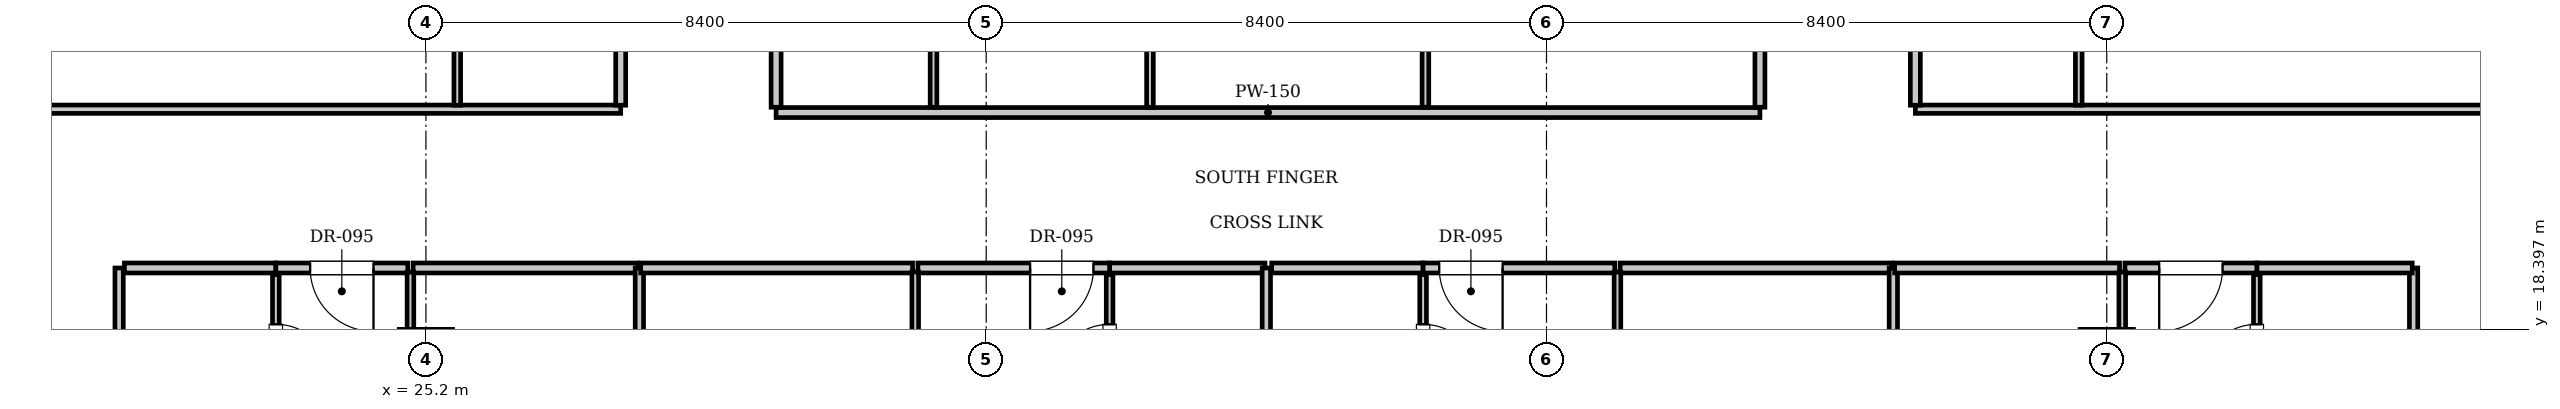
"""IFC4 building model, lengths in metres.
Left out: names, types, materials, properties, quantities, classifications, styles, units other than length and angle.
Written with IfcOpenShell. Run it as: python <this file> out.ifc"""

import sys

from ifc_helpers import new_model, si_unit, direction, frame, frame_2d, origin, origin_2d, place, context, subcontext, project, spatial, rectangle, extrude, element, fill, save


model = new_model("IFC4")
c1 = context("Model", 3, precision=1e-05, world=origin(), true_north=direction((0.0, 1.0)))
c2 = subcontext(c1, "Body", "Model", "MODEL_VIEW")
j1 = project(units=[si_unit("LENGTHUNIT", "METRE"), si_unit("PLANEANGLEUNIT", "RADIAN")], contexts=[c1])
p1 = place(None, origin())
s1 = spatial("IfcSite", under=j1, at=p1, CompositionType="ELEMENT")
p2 = place(p1, origin())
s2 = spatial("IfcBuilding", under=s1, at=p2, CompositionType="ELEMENT")
p3 = place(p2, frame((0.0, 0.0, 308.7)))
s3 = spatial("IfcBuildingStorey", under=s2, at=p3, CompositionType="ELEMENT", Elevation=308.7)
for number, where, z_axis, x_axis in (
    (1, (25.2, 18.0, 0.0), (0.0, 0.0, 1.0), (1.0, 0.0, 0.0)),
    (2, (50.4, 18.0, 0.0), (0.0, 0.0, 1.0), (1.0, 0.0, 0.0)),
):
    element("IfcColumn", number, at=place(p3, frame(where, z_axis=z_axis, x_axis=x_axis)), inside=s3, PredefinedType="COLUMN", context=c2, shape_type="SweptSolid", body=[
        extrude(rectangle(XDim=0.8, YDim=0.8, at=origin_2d()), origin(), (0.0, 0.0, 1.0), 3.85),
    ])
p4 = place(p3, frame((30.45, 21.65, 0.0), z_axis=(0.0, 0.0, 1.0), x_axis=(1.0, 0.0, 0.0)))
e3 = element("IfcWall", 3, at=p4, inside=s3, PredefinedType="PARTITIONING", context=c2, shape_type="SweptSolid", body=[
    extrude(rectangle(XDim=14.75, YDim=0.15, at=frame_2d((7.375, 0.0))), origin(), (0.0, 0.0, 1.0), 3.61),
])
for number, where, z_axis, x_axis in (
    (4, (30.45, 21.73, 0.0), (0.0, 0.0, 1.0), (0.0, 1.0, 0.0)),
    (5, (45.2, 21.73, 0.0), (0.0, 0.0, 1.0), (0.0, 1.0, 0.0)),
):
    element("IfcWall", number, at=place(p3, frame(where, z_axis=z_axis, x_axis=x_axis)), inside=s3, PredefinedType="PARTITIONING", context=c2, shape_type="SweptSolid", body=[
        extrude(rectangle(XDim=8.49, YDim=0.15, at=frame_2d((4.245, 0.0))), origin(), (0.0, 0.0, 1.0), 3.61),
    ])
for number, where, z_axis, x_axis in (
    (6, (32.81, 21.73, 0.0), (0.0, 0.0, 1.0), (0.0, 1.0, 0.0)),
    (7, (36.055, 21.73, 0.0), (0.0, 0.0, 1.0), (0.0, 1.0, 0.0)),
    (8, (40.185, 21.73, 0.0), (0.0, 0.0, 1.0), (0.0, 1.0, 0.0)),
):
    element("IfcWall", number, at=place(p3, frame(where, z_axis=z_axis, x_axis=x_axis)), inside=s3, PredefinedType="PARTITIONING", context=c2, shape_type="SweptSolid", body=[
        extrude(rectangle(XDim=8.49, YDim=0.1, at=frame_2d((4.245, 0.0))), origin(), (0.0, 0.0, 1.0), 3.61),
    ])
for number, where, z_axis, x_axis in (
    (9, (20.6, 14.4, 0.0), (0.0, 0.0, 1.0), (0.0, 1.0, 0.0)),
    (10, (55.0, 14.4, 0.0), (0.0, 0.0, 1.0), (0.0, 1.0, 0.0)),
):
    element("IfcWall", number, at=place(p3, frame(where, z_axis=z_axis, x_axis=x_axis)), inside=s3, PredefinedType="PARTITIONING", context=c2, shape_type="SweptSolid", body=[
        extrude(rectangle(XDim=4.92, YDim=0.125, at=frame_2d((2.46, 0.0))), origin(), (0.0, 0.0, 1.0), 3.61),
    ])
p5 = place(p3, frame((20.68, 19.32, 0.0), z_axis=(0.0, 0.0, 1.0), x_axis=(1.0, 0.0, 0.0)))
e11 = element("IfcWall", 11, at=p5, inside=s3, PredefinedType="PARTITIONING", context=c2, shape_type="SweptSolid", body=[
    extrude(rectangle(XDim=2.27, YDim=0.15, at=frame_2d((1.135, 0.0))), origin(), (0.0, 0.0, 1.0), 3.61),
])
p6 = place(p3, frame((22.95, 16.88, 0.0), z_axis=(0.0, 0.0, 1.0), x_axis=(0.0, 1.0, 0.0)))
e12 = element("IfcWall", 12, at=p6, inside=s3, PredefinedType="PARTITIONING", context=c2, shape_type="SweptSolid", body=[
    extrude(rectangle(XDim=2.34, YDim=0.1, at=frame_2d((1.17, 0.0))), origin(), (0.0, 0.0, 1.0), 3.61),
])
p7 = place(p6, frame((0.745, 0.0, 0.0)))
e13 = element("IfcOpeningElement", 13, at=p7, cuts=e12, PredefinedType="OPENING", context=c2, shape_type="SweptSolid", body=[
    extrude(rectangle(XDim=0.85, YDim=2.1, at=frame_2d((0.425, 1.05))), frame((0.0, 0.06, 0.0), z_axis=(0.0, -1.0, 0.0), x_axis=(1.0, 0.0, 0.0)), (0.0, 0.0, 1.0), 0.12),
])
p8 = place(p3, frame((22.95, 19.32, 0.0), z_axis=(0.0, 0.0, 1.0), x_axis=(1.0, 0.0, 0.0)))
e14 = element("IfcWall", 14, at=p8, inside=s3, PredefinedType="PARTITIONING", context=c2, shape_type="SweptSolid", body=[
    extrude(rectangle(XDim=1.978, YDim=0.15, at=frame_2d((0.989, 0.0))), origin(), (0.0, 0.0, 1.0), 3.61),
])
p9 = place(p8, frame((0.514, 0.0, 0.0)))
e15 = element("IfcOpeningElement", 15, at=p9, cuts=e14, PredefinedType="OPENING", context=c2, shape_type="SweptSolid", body=[
    extrude(rectangle(XDim=0.95, YDim=2.15, at=frame_2d((0.475, 1.075))), frame((0.0, 0.085, 0.0), z_axis=(0.0, -1.0, 0.0), x_axis=(1.0, 0.0, 0.0)), (0.0, 0.0, 1.0), 0.17),
])
p10 = place(p3, frame((25.008, 19.32, 0.0), z_axis=(0.0, 0.0, 1.0), x_axis=(1.0, 0.0, 0.0)))
e16 = element("IfcWall", 16, at=p10, inside=s3, PredefinedType="PARTITIONING", context=c2, shape_type="SweptSolid", body=[
    extrude(rectangle(XDim=3.372, YDim=0.15, at=frame_2d((1.686, 0.0))), origin(), (0.0, 0.0, 1.0), 3.61),
])
p11 = place(p3, frame((24.968, 9.23, 0.0), z_axis=(0.0, 0.0, 1.0), x_axis=(0.0, 1.0, 0.0)))
e17 = element("IfcWall", 17, at=p11, inside=s3, PredefinedType="PARTITIONING", context=c2, shape_type="SweptSolid", body=[
    extrude(rectangle(XDim=10.03, YDim=0.1, at=frame_2d((5.015, 0.0))), origin(), (0.0, 0.0, 1.0), 3.61),
])
p12 = place(p11, frame((1.6, 0.0, 0.0)))
e18 = element("IfcOpeningElement", 18, at=p12, cuts=e17, PredefinedType="OPENING", context=c2, shape_type="SweptSolid", body=[
    extrude(rectangle(XDim=0.9, YDim=2.1, at=frame_2d((0.45, 1.05))), frame((0.0, 0.06, 0.0), z_axis=(0.0, -1.0, 0.0), x_axis=(1.0, 0.0, 0.0)), (0.0, 0.0, 1.0), 0.12),
])
p13 = place(p3, frame((28.4, 9.3, 0.0), z_axis=(0.0, 0.0, 1.0), x_axis=(0.0, 1.0, 0.0)))
e19 = element("IfcWall", 19, at=p13, inside=s3, PredefinedType="PARTITIONING", context=c2, shape_type="SweptSolid", body=[
    extrude(rectangle(XDim=10.02, YDim=0.125, at=frame_2d((5.01, 0.0))), origin(), (0.0, 0.0, 1.0), 3.61),
])
p14 = place(p3, frame((35.45, 19.32, 0.0), z_axis=(0.0, 0.0, 1.0), x_axis=(1.0, 0.0, 0.0)))
e20 = element("IfcWall", 20, at=p14, inside=s3, PredefinedType="PARTITIONING", context=c2, shape_type="SweptSolid", body=[
    extrude(rectangle(XDim=2.33, YDim=0.15, at=frame_2d((1.165, 0.0))), origin(), (0.0, 0.0, 1.0), 3.61),
])
p15 = place(p3, frame((35.45, 16.88, 0.0), z_axis=(0.0, 0.0, 1.0), x_axis=(0.0, 1.0, 0.0)))
e21 = element("IfcWall", 21, at=p15, inside=s3, PredefinedType="PARTITIONING", context=c2, shape_type="SweptSolid", body=[
    extrude(rectangle(XDim=2.34, YDim=0.1, at=frame_2d((1.17, 0.0))), origin(), (0.0, 0.0, 1.0), 3.61),
])
p16 = place(p15, frame((0.745, 0.0, 0.0)))
e22 = element("IfcOpeningElement", 22, at=p16, cuts=e21, PredefinedType="OPENING", context=c2, shape_type="SweptSolid", body=[
    extrude(rectangle(XDim=0.85, YDim=2.1, at=frame_2d((0.425, 1.05))), frame((0.0, 0.06, 0.0), z_axis=(0.0, -1.0, 0.0), x_axis=(1.0, 0.0, 0.0)), (0.0, 0.0, 1.0), 0.12),
])
p17 = place(p3, frame((28.42, 19.32, 0.0), z_axis=(0.0, 0.0, 1.0), x_axis=(1.0, 0.0, 0.0)))
e23 = element("IfcWall", 23, at=p17, inside=s3, PredefinedType="PARTITIONING", context=c2, shape_type="SweptSolid", body=[
    extrude(rectangle(XDim=4.076, YDim=0.15, at=frame_2d((2.038, 0.0))), origin(), (0.0, 0.0, 1.0), 3.61),
])
p18 = place(p3, frame((32.576, 19.32, 0.0), z_axis=(0.0, 0.0, 1.0), x_axis=(1.0, 0.0, 0.0)))
e24 = element("IfcWall", 24, at=p18, inside=s3, PredefinedType="PARTITIONING", context=c2, shape_type="SweptSolid", body=[
    extrude(rectangle(XDim=2.874, YDim=0.15, at=frame_2d((1.437, 0.0))), origin(), (0.0, 0.0, 1.0), 3.61),
])
p19 = place(p18, frame((1.682, 0.0, 0.0)))
e25 = element("IfcOpeningElement", 25, at=p19, cuts=e24, PredefinedType="OPENING", context=c2, shape_type="SweptSolid", body=[
    extrude(rectangle(XDim=0.95, YDim=2.15, at=frame_2d((0.475, 1.075))), frame((0.0, 0.085, 0.0), z_axis=(0.0, -1.0, 0.0), x_axis=(1.0, 0.0, 0.0)), (0.0, 0.0, 1.0), 0.17),
])
p20 = place(p3, frame((32.536, 9.23, 0.0), z_axis=(0.0, 0.0, 1.0), x_axis=(0.0, 1.0, 0.0)))
e26 = element("IfcWall", 26, at=p20, inside=s3, PredefinedType="PARTITIONING", context=c2, shape_type="SweptSolid", body=[
    extrude(rectangle(XDim=10.03, YDim=0.1, at=frame_2d((5.015, 0.0))), origin(), (0.0, 0.0, 1.0), 3.61),
])
p21 = place(p20, frame((1.6, 0.0, 0.0)))
e27 = element("IfcOpeningElement", 27, at=p21, cuts=e26, PredefinedType="OPENING", context=c2, shape_type="SweptSolid", body=[
    extrude(rectangle(XDim=0.9, YDim=2.1, at=frame_2d((0.45, 1.05))), frame((0.0, 0.06, 0.0), z_axis=(0.0, -1.0, 0.0), x_axis=(1.0, 0.0, 0.0)), (0.0, 0.0, 1.0), 0.12),
])
p22 = place(p3, frame((37.8, 9.3, 0.0), z_axis=(0.0, 0.0, 1.0), x_axis=(0.0, 1.0, 0.0)))
e28 = element("IfcWall", 28, at=p22, inside=s3, PredefinedType="PARTITIONING", context=c2, shape_type="SweptSolid", body=[
    extrude(rectangle(XDim=10.02, YDim=0.125, at=frame_2d((5.01, 0.0))), origin(), (0.0, 0.0, 1.0), 3.255),
])
p23 = place(p3, frame((37.88, 19.32, 0.0), z_axis=(0.0, 0.0, 1.0), x_axis=(1.0, 0.0, 0.0)))
e29 = element("IfcWall", 29, at=p23, inside=s3, PredefinedType="PARTITIONING", context=c2, shape_type="SweptSolid", body=[
    extrude(rectangle(XDim=2.27, YDim=0.15, at=frame_2d((1.135, 0.0))), origin(), (0.0, 0.0, 1.0), 3.61),
])
p24 = place(p3, frame((40.15, 16.88, 0.0), z_axis=(0.0, 0.0, 1.0), x_axis=(0.0, 1.0, 0.0)))
e30 = element("IfcWall", 30, at=p24, inside=s3, PredefinedType="PARTITIONING", context=c2, shape_type="SweptSolid", body=[
    extrude(rectangle(XDim=2.34, YDim=0.1, at=frame_2d((1.17, 0.0))), origin(), (0.0, 0.0, 1.0), 3.61),
])
p25 = place(p24, frame((0.745, 0.0, 0.0)))
e31 = element("IfcOpeningElement", 31, at=p25, cuts=e30, PredefinedType="OPENING", context=c2, shape_type="SweptSolid", body=[
    extrude(rectangle(XDim=0.85, YDim=2.1, at=frame_2d((0.425, 1.05))), frame((0.0, 0.06, 0.0), z_axis=(0.0, -1.0, 0.0), x_axis=(1.0, 0.0, 0.0)), (0.0, 0.0, 1.0), 0.12),
])
p26 = place(p3, frame((40.15, 19.32, 0.0), z_axis=(0.0, 0.0, 1.0), x_axis=(1.0, 0.0, 0.0)))
e32 = element("IfcWall", 32, at=p26, inside=s3, PredefinedType="PARTITIONING", context=c2, shape_type="SweptSolid", body=[
    extrude(rectangle(XDim=2.874, YDim=0.15, at=frame_2d((1.437, 0.0))), origin(), (0.0, 0.0, 1.0), 3.61),
])
p27 = place(p26, frame((0.242, 0.0, 0.0)))
e33 = element("IfcOpeningElement", 33, at=p27, cuts=e32, PredefinedType="OPENING", context=c2, shape_type="SweptSolid", body=[
    extrude(rectangle(XDim=0.95, YDim=2.15, at=frame_2d((0.475, 1.075))), frame((0.0, 0.085, 0.0), z_axis=(0.0, -1.0, 0.0), x_axis=(1.0, 0.0, 0.0)), (0.0, 0.0, 1.0), 0.17),
])
p28 = place(p3, frame((43.104, 19.32, 0.0), z_axis=(0.0, 0.0, 1.0), x_axis=(1.0, 0.0, 0.0)))
e34 = element("IfcWall", 34, at=p28, inside=s3, PredefinedType="PARTITIONING", context=c2, shape_type="SweptSolid", body=[
    extrude(rectangle(XDim=4.076, YDim=0.15, at=frame_2d((2.038, 0.0))), origin(), (0.0, 0.0, 1.0), 3.61),
])
p29 = place(p3, frame((43.064, 9.23, 0.0), z_axis=(0.0, 0.0, 1.0), x_axis=(0.0, 1.0, 0.0)))
e35 = element("IfcWall", 35, at=p29, inside=s3, PredefinedType="PARTITIONING", context=c2, shape_type="SweptSolid", body=[
    extrude(rectangle(XDim=10.03, YDim=0.1, at=frame_2d((5.015, 0.0))), origin(), (0.0, 0.0, 1.0), 3.61),
])
p30 = place(p29, frame((1.6, 0.0, 0.0)))
e36 = element("IfcOpeningElement", 36, at=p30, cuts=e35, PredefinedType="OPENING", context=c2, shape_type="SweptSolid", body=[
    extrude(rectangle(XDim=0.9, YDim=2.1, at=frame_2d((0.45, 1.05))), frame((0.0, 0.06, 0.0), z_axis=(0.0, -1.0, 0.0), x_axis=(1.0, 0.0, 0.0)), (0.0, 0.0, 1.0), 0.12),
])
p31 = place(p3, frame((47.2, 9.3, 0.0), z_axis=(0.0, 0.0, 1.0), x_axis=(0.0, 1.0, 0.0)))
e37 = element("IfcWall", 37, at=p31, inside=s3, PredefinedType="PARTITIONING", context=c2, shape_type="SweptSolid", body=[
    extrude(rectangle(XDim=10.02, YDim=0.125, at=frame_2d((5.01, 0.0))), origin(), (0.0, 0.0, 1.0), 3.61),
])
p32 = place(p3, frame((52.65, 19.32, 0.0), z_axis=(0.0, 0.0, 1.0), x_axis=(1.0, 0.0, 0.0)))
e38 = element("IfcWall", 38, at=p32, inside=s3, PredefinedType="PARTITIONING", context=c2, shape_type="SweptSolid", body=[
    extrude(rectangle(XDim=2.33, YDim=0.15, at=frame_2d((1.165, 0.0))), origin(), (0.0, 0.0, 1.0), 3.61),
])
p33 = place(p3, frame((52.65, 16.88, 0.0), z_axis=(0.0, 0.0, 1.0), x_axis=(0.0, 1.0, 0.0)))
e39 = element("IfcWall", 39, at=p33, inside=s3, PredefinedType="PARTITIONING", context=c2, shape_type="SweptSolid", body=[
    extrude(rectangle(XDim=2.34, YDim=0.1, at=frame_2d((1.17, 0.0))), origin(), (0.0, 0.0, 1.0), 3.61),
])
p34 = place(p33, frame((0.745, 0.0, 0.0)))
e40 = element("IfcOpeningElement", 40, at=p34, cuts=e39, PredefinedType="OPENING", context=c2, shape_type="SweptSolid", body=[
    extrude(rectangle(XDim=0.85, YDim=2.1, at=frame_2d((0.425, 1.05))), frame((0.0, 0.06, 0.0), z_axis=(0.0, -1.0, 0.0), x_axis=(1.0, 0.0, 0.0)), (0.0, 0.0, 1.0), 0.12),
])
p35 = place(p3, frame((47.22, 19.32, 0.0), z_axis=(0.0, 0.0, 1.0), x_axis=(1.0, 0.0, 0.0)))
e41 = element("IfcWall", 41, at=p35, inside=s3, PredefinedType="PARTITIONING", context=c2, shape_type="SweptSolid", body=[
    extrude(rectangle(XDim=3.372, YDim=0.15, at=frame_2d((1.686, 0.0))), origin(), (0.0, 0.0, 1.0), 3.61),
])
p36 = place(p3, frame((50.672, 19.32, 0.0), z_axis=(0.0, 0.0, 1.0), x_axis=(1.0, 0.0, 0.0)))
e42 = element("IfcWall", 42, at=p36, inside=s3, PredefinedType="PARTITIONING", context=c2, shape_type="SweptSolid", body=[
    extrude(rectangle(XDim=1.978, YDim=0.15, at=frame_2d((0.989, 0.0))), origin(), (0.0, 0.0, 1.0), 3.61),
])
p37 = place(p36, frame((0.514, 0.0, 0.0)))
e43 = element("IfcOpeningElement", 43, at=p37, cuts=e42, PredefinedType="OPENING", context=c2, shape_type="SweptSolid", body=[
    extrude(rectangle(XDim=0.95, YDim=2.15, at=frame_2d((0.475, 1.075))), frame((0.0, 0.085, 0.0), z_axis=(0.0, -1.0, 0.0), x_axis=(1.0, 0.0, 0.0)), (0.0, 0.0, 1.0), 0.17),
])
p38 = place(p3, frame((50.632, 9.23, 0.0), z_axis=(0.0, 0.0, 1.0), x_axis=(0.0, 1.0, 0.0)))
e44 = element("IfcWall", 44, at=p38, inside=s3, PredefinedType="PARTITIONING", context=c2, shape_type="SweptSolid", body=[
    extrude(rectangle(XDim=10.03, YDim=0.1, at=frame_2d((5.015, 0.0))), origin(), (0.0, 0.0, 1.0), 3.61),
])
p39 = place(p38, frame((1.6, 0.0, 0.0)))
e45 = element("IfcOpeningElement", 45, at=p39, cuts=e44, PredefinedType="OPENING", context=c2, shape_type="SweptSolid", body=[
    extrude(rectangle(XDim=0.9, YDim=2.1, at=frame_2d((0.45, 1.05))), frame((0.0, 0.06, 0.0), z_axis=(0.0, -1.0, 0.0), x_axis=(1.0, 0.0, 0.0)), (0.0, 0.0, 1.0), 0.12),
])
p40 = place(p3, frame((15.5, 21.7, 0.0), z_axis=(0.0, 0.0, 1.0), x_axis=(1.0, 0.0, 0.0)))
e46 = element("IfcWall", 46, at=p40, inside=s3, PredefinedType="PARTITIONING", context=c2, shape_type="SweptSolid", body=[
    extrude(rectangle(XDim=12.62, YDim=0.125, at=frame_2d((6.31, 0.0))), origin(), (0.0, 0.0, 1.0), 3.61),
])
p41 = place(p3, frame((47.53, 21.7, 0.0), z_axis=(0.0, 0.0, 1.0), x_axis=(1.0, 0.0, 0.0)))
e47 = element("IfcWall", 47, at=p41, inside=s3, PredefinedType="PARTITIONING", context=c2, shape_type="SweptSolid", body=[
    extrude(rectangle(XDim=12.57, YDim=0.125, at=frame_2d((6.285, 0.0))), origin(), (0.0, 0.0, 1.0), 3.61),
])
p42 = place(p3, frame((28.12, 21.76, 0.0), z_axis=(0.0, 0.0, 1.0), x_axis=(0.0, 1.0, 0.0)))
e48 = element("IfcWall", 48, at=p42, inside=s3, PredefinedType="PARTITIONING", context=c2, shape_type="SweptSolid", body=[
    extrude(rectangle(XDim=1.89, YDim=0.15, at=frame_2d((0.945, 0.0))), origin(), (0.0, 0.0, 1.0), 3.61),
])
p43 = place(p3, frame((25.67, 21.76, 0.0), z_axis=(0.0, 0.0, 1.0), x_axis=(0.0, 1.0, 0.0)))
e49 = element("IfcWall", 49, at=p43, inside=s3, PredefinedType="PARTITIONING", context=c2, shape_type="SweptSolid", body=[
    extrude(rectangle(XDim=1.89, YDim=0.1, at=frame_2d((0.945, 0.0))), origin(), (0.0, 0.0, 1.0), 3.61),
])
p44 = place(p3, frame((47.53, 21.76, 0.0), z_axis=(0.0, 0.0, 1.0), x_axis=(0.0, 1.0, 0.0)))
e50 = element("IfcWall", 50, at=p44, inside=s3, PredefinedType="PARTITIONING", context=c2, shape_type="SweptSolid", body=[
    extrude(rectangle(XDim=1.89, YDim=0.15, at=frame_2d((0.945, 0.0))), origin(), (0.0, 0.0, 1.0), 3.61),
])
p45 = place(p3, frame((49.98, 21.76, 0.0), z_axis=(0.0, 0.0, 1.0), x_axis=(0.0, 1.0, 0.0)))
e51 = element("IfcWall", 51, at=p45, inside=s3, PredefinedType="PARTITIONING", context=c2, shape_type="SweptSolid", body=[
    extrude(rectangle(XDim=1.89, YDim=0.1, at=frame_2d((0.945, 0.0))), origin(), (0.0, 0.0, 1.0), 3.61),
])
p46 = place(p7, frame((0.85, 0.0, 0.0), z_axis=(0.0, 0.0, 1.0), x_axis=(-1.0, 0.0, 0.0)))
e52 = element("IfcDoor", 52, at=p46, inside=s3, OperationType="SINGLE_SWING_RIGHT", PredefinedType="DOOR", context=c2, shape_type="SweptSolid", body=[
    extrude(rectangle(XDim=0.85, YDim=2.1, at=frame_2d((0.425, 1.05))), frame((0.0, 0.025, 0.0), z_axis=(0.0, -1.0, 0.0), x_axis=(1.0, 0.0, 0.0)), (0.0, 0.0, 1.0), 0.05),
])
fill(e13, e52)
p47 = place(p9, frame((0.95, 0.0, 0.0), z_axis=(0.0, 0.0, 1.0), x_axis=(-1.0, 0.0, 0.0)))
e53 = element("IfcDoor", 53, at=p47, inside=s3, OperationType="SINGLE_SWING_LEFT", PredefinedType="DOOR", context=c2, shape_type="SweptSolid", body=[
    extrude(rectangle(XDim=0.95, YDim=2.15, at=frame_2d((0.475, 1.075))), frame((0.0, 0.025, 0.0), z_axis=(0.0, -1.0, 0.0), x_axis=(1.0, 0.0, 0.0)), (0.0, 0.0, 1.0), 0.05),
])
fill(e15, e53)
p48 = place(p16, origin())
e54 = element("IfcDoor", 54, at=p48, inside=s3, OperationType="SINGLE_SWING_LEFT", PredefinedType="DOOR", context=c2, shape_type="SweptSolid", body=[
    extrude(rectangle(XDim=0.85, YDim=2.1, at=frame_2d((0.425, 1.05))), frame((0.0, 0.025, 0.0), z_axis=(0.0, -1.0, 0.0), x_axis=(1.0, 0.0, 0.0)), (0.0, 0.0, 1.0), 0.05),
])
fill(e22, e54)
p49 = place(p19, frame((0.95, 0.0, 0.0), z_axis=(0.0, 0.0, 1.0), x_axis=(-1.0, 0.0, 0.0)))
e55 = element("IfcDoor", 55, at=p49, inside=s3, OperationType="SINGLE_SWING_RIGHT", PredefinedType="DOOR", context=c2, shape_type="SweptSolid", body=[
    extrude(rectangle(XDim=0.95, YDim=2.15, at=frame_2d((0.475, 1.075))), frame((0.0, 0.025, 0.0), z_axis=(0.0, -1.0, 0.0), x_axis=(1.0, 0.0, 0.0)), (0.0, 0.0, 1.0), 0.05),
])
fill(e25, e55)
p50 = place(p25, frame((0.85, 0.0, 0.0), z_axis=(0.0, 0.0, 1.0), x_axis=(-1.0, 0.0, 0.0)))
e56 = element("IfcDoor", 56, at=p50, inside=s3, OperationType="SINGLE_SWING_RIGHT", PredefinedType="DOOR", context=c2, shape_type="SweptSolid", body=[
    extrude(rectangle(XDim=0.85, YDim=2.1, at=frame_2d((0.425, 1.05))), frame((0.0, 0.025, 0.0), z_axis=(0.0, -1.0, 0.0), x_axis=(1.0, 0.0, 0.0)), (0.0, 0.0, 1.0), 0.05),
])
fill(e31, e56)
p51 = place(p27, frame((0.95, 0.0, 0.0), z_axis=(0.0, 0.0, 1.0), x_axis=(-1.0, 0.0, 0.0)))
e57 = element("IfcDoor", 57, at=p51, inside=s3, OperationType="SINGLE_SWING_LEFT", PredefinedType="DOOR", context=c2, shape_type="SweptSolid", body=[
    extrude(rectangle(XDim=0.95, YDim=2.15, at=frame_2d((0.475, 1.075))), frame((0.0, 0.025, 0.0), z_axis=(0.0, -1.0, 0.0), x_axis=(1.0, 0.0, 0.0)), (0.0, 0.0, 1.0), 0.05),
])
fill(e33, e57)
p52 = place(p34, origin())
e58 = element("IfcDoor", 58, at=p52, inside=s3, OperationType="SINGLE_SWING_LEFT", PredefinedType="DOOR", context=c2, shape_type="SweptSolid", body=[
    extrude(rectangle(XDim=0.85, YDim=2.1, at=frame_2d((0.425, 1.05))), frame((0.0, 0.025, 0.0), z_axis=(0.0, -1.0, 0.0), x_axis=(1.0, 0.0, 0.0)), (0.0, 0.0, 1.0), 0.05),
])
fill(e40, e58)
p53 = place(p37, frame((0.95, 0.0, 0.0), z_axis=(0.0, 0.0, 1.0), x_axis=(-1.0, 0.0, 0.0)))
e59 = element("IfcDoor", 59, at=p53, inside=s3, OperationType="SINGLE_SWING_RIGHT", PredefinedType="DOOR", context=c2, shape_type="SweptSolid", body=[
    extrude(rectangle(XDim=0.95, YDim=2.15, at=frame_2d((0.475, 1.075))), frame((0.0, 0.025, 0.0), z_axis=(0.0, -1.0, 0.0), x_axis=(1.0, 0.0, 0.0)), (0.0, 0.0, 1.0), 0.05),
])
fill(e43, e59)
save(model, sys.argv[1])
